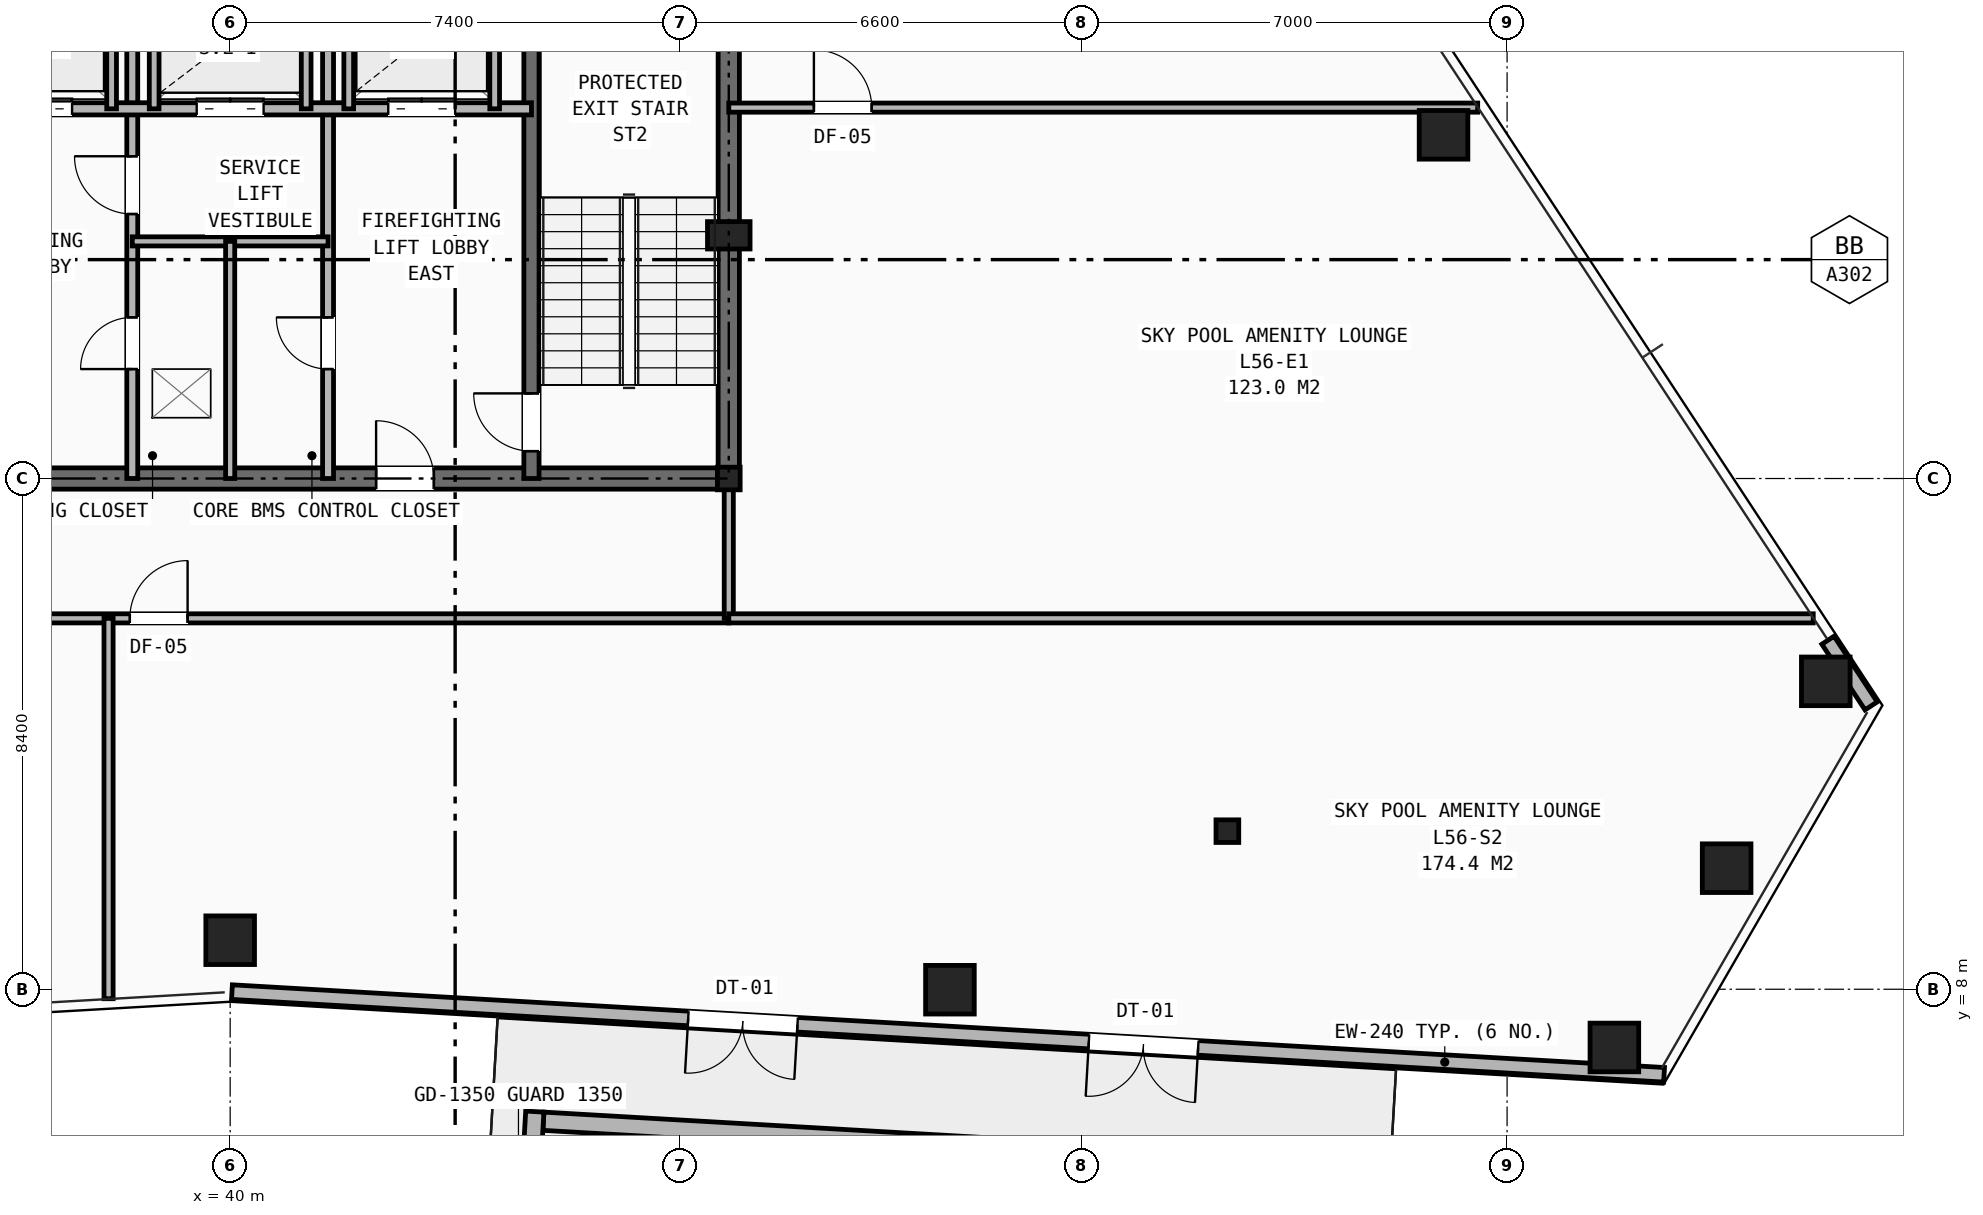
"""IFC4 building model, lengths in metres.
Left out: names, types, materials, properties, quantities, classifications, styles, units other than length and angle.
Written with IfcOpenShell. Run it as: python <this file> out.ifc"""

import sys

from ifc_helpers import new_model, si_unit, direction, frame, frame_2d, origin, origin_2d, place, context, subcontext, project, spatial, rectangle, hollow_rectangle, i_section, extrude, element, fill, save


model = new_model("IFC4")
c1 = context("Model", 3, precision=1e-05, world=origin(), true_north=direction((0.0, 1.0)))
c2 = subcontext(c1, "Body", "Model", "MODEL_VIEW")
j1 = project(units=[si_unit("LENGTHUNIT", "METRE"), si_unit("PLANEANGLEUNIT", "RADIAN")], contexts=[c1])
p1 = place(None, origin())
s1 = spatial("IfcSite", under=j1, at=p1, CompositionType="ELEMENT")
p2 = place(p1, origin())
s2 = spatial("IfcBuilding", under=s1, at=p2, CompositionType="ELEMENT")
p3 = place(p2, frame((0.0, 0.0, 196.5)))
s3 = spatial("IfcBuildingStorey", under=s2, at=p3, CompositionType="ELEMENT", Elevation=196.5)
for number, where, z_axis, x_axis in (
    (1, (48.2, 16.4, 0.0), (0.0, 0.0, 1.0), (1.0, 0.0, 0.0)),
    (2, (56.4, 10.6, 0.0), (0.0, 0.0, 1.0), (1.0, 0.0, 0.0)),
):
    element("IfcColumn", number, at=place(p3, frame(where, z_axis=z_axis, x_axis=x_axis)), inside=s3, PredefinedType="COLUMN", context=c2, shape_type="SweptSolid", body=[
        extrude(i_section(OverallWidth=0.374, OverallDepth=0.372, WebThickness=0.016, FlangeThickness=0.026, at=origin_2d()), origin(), (0.0, 0.0, 1.0), 4.2),
    ])
p4 = place(p3, frame((48.2, 20.4, 0.0), z_axis=(0.0, 0.0, 1.0), x_axis=(1.0, 0.0, 0.0)))
e3 = element("IfcColumn", 3, at=p4, inside=s3, PredefinedType="PILASTER", context=c2, shape_type="SweptSolid", body=[
    extrude(rectangle(XDim=0.7, YDim=0.45, at=origin_2d()), origin(), (0.0, 0.0, 1.0), 4.2),
])
for number, where, z_axis, x_axis in (
    (4, (40.0, 8.806, 0.0), (0.0, 0.0, 1.0), (1.0, 0.0, 0.0)),
    (5, (51.837, 7.992, 0.0), (0.0, 0.0, 1.0), (1.0, 0.0, 0.0)),
    (6, (62.764, 7.042, 0.0), (0.0, 0.0, 1.0), (1.0, 0.0, 0.0)),
    (7, (64.611, 9.991, 0.0), (0.0, 0.0, 1.0), (1.0, 0.0, 0.0)),
    (8, (66.241, 13.064, 0.0), (0.0, 0.0, 1.0), (1.0, 0.0, 0.0)),
    (9, (59.955, 22.052, 0.0), (0.0, 0.0, 1.0), (1.0, 0.0, 0.0)),
):
    element("IfcColumn", number, at=place(p3, frame(where, z_axis=z_axis, x_axis=x_axis)), inside=s3, PredefinedType="COLUMN", context=c2, shape_type="SweptSolid", body=[
        extrude(hollow_rectangle(XDim=0.8, YDim=0.8, WallThickness=0.055, at=origin_2d()), origin(), (0.0, 0.0, 1.0), 4.2),
    ])
p5 = place(p3, frame((63.582, 6.593, 0.0), z_axis=(0.0, 0.0, 1.0), x_axis=(-0.998337343027, 0.057641560683, 0.0)))
e10 = element("IfcWall", 10, at=p5, inside=s3, PredefinedType="SHEAR", context=c2, shape_type="SweptSolid", body=[
    extrude(rectangle(XDim=23.592, YDim=0.24, at=frame_2d((11.796, 0.0))), origin(), (0.0, 0.0, 1.0), 3.313),
])
p6 = place(p5, frame((7.676, 0.0, 0.0)))
e11 = element("IfcOpeningElement", 11, at=p6, cuts=e10, PredefinedType="OPENING", context=c2, shape_type="SweptSolid", body=[
    extrude(rectangle(XDim=1.8, YDim=2.2, at=frame_2d((0.9, 1.1))), frame((0.0, 0.13, 0.0), z_axis=(0.0, -1.0, 0.0), x_axis=(1.0, 0.0, 0.0)), (0.0, 0.0, 1.0), 0.26),
])
p7 = place(p5, frame((14.276, 0.0, 0.0)))
e12 = element("IfcOpeningElement", 12, at=p7, cuts=e10, PredefinedType="OPENING", context=c2, shape_type="SweptSolid", body=[
    extrude(rectangle(XDim=1.8, YDim=2.2, at=frame_2d((0.9, 1.1))), frame((0.0, 0.13, 0.0), z_axis=(0.0, -1.0, 0.0), x_axis=(1.0, 0.0, 0.0)), (0.0, 0.0, 1.0), 0.26),
])
p8 = place(p3, frame((66.987, 12.66, 0.0), z_axis=(0.0, 0.0, 1.0), x_axis=(-0.549064814004, 0.835779773638, 0.0)))
e13 = element("IfcWall", 13, at=p8, inside=s3, PredefinedType="SHEAR", context=c2, shape_type="SweptSolid", body=[
    extrude(rectangle(XDim=1.292, YDim=0.24, at=frame_2d((0.646, 0.0))), origin(), (0.0, 0.0, 1.0), 3.313),
])
p9 = place(p3, frame((45.151, 5.829, 0.0), z_axis=(0.0, 0.0, 1.0), x_axis=(0.998337220259, -0.057643686945, 0.0)))
e14 = element("IfcWall", 14, at=p9, inside=s3, PredefinedType="STANDARD", context=c2, shape_type="SweptSolid", body=[
    extrude(rectangle(XDim=13.1, YDim=0.3, at=frame_2d((6.55, 0.0))), origin(), (0.0, 0.0, 1.0), 1.45),
])
p10 = place(p3, frame((45.01, 5.988, 0.0), z_axis=(0.0, 0.0, 1.0), x_axis=(-0.057659687079, -0.998336296288, 0.0)))
e15 = element("IfcWall", 15, at=p10, inside=s3, PredefinedType="STANDARD", context=c2, shape_type="SweptSolid", body=[
    extrude(rectangle(XDim=5.335, YDim=0.3, at=frame_2d((2.667, 0.0))), origin(), (0.0, 0.0, 1.0), 1.45),
])
p11 = place(p3, frame((31.8, 16.4, 0.0), z_axis=(0.0, 0.0, 1.0), x_axis=(1.0, 0.0, 0.0)))
e16 = element("IfcWall", 16, at=p11, inside=s3, PredefinedType="SHEAR", context=c2, shape_type="SweptSolid", body=[
    extrude(rectangle(XDim=16.4, YDim=0.35, at=frame_2d((8.2, 0.0))), origin(), (0.0, 0.0, 1.0), 3.94),
])
p12 = place(p11, frame((4.2, 0.0, 0.0)))
e17 = element("IfcOpeningElement", 17, at=p12, cuts=e16, PredefinedType="OPENING", context=c2, shape_type="SweptSolid", body=[
    extrude(rectangle(XDim=0.95, YDim=2.1, at=frame_2d((0.475, 1.05))), frame((0.0, 0.185, 0.0), z_axis=(0.0, -1.0, 0.0), x_axis=(1.0, 0.0, 0.0)), (0.0, 0.0, 1.0), 0.37),
])
p13 = place(p11, frame((10.6, 0.0, 0.0)))
e18 = element("IfcOpeningElement", 18, at=p13, cuts=e16, PredefinedType="OPENING", context=c2, shape_type="SweptSolid", body=[
    extrude(rectangle(XDim=0.95, YDim=2.1, at=frame_2d((0.475, 1.05))), frame((0.0, 0.185, 0.0), z_axis=(0.0, -1.0, 0.0), x_axis=(1.0, 0.0, 0.0)), (0.0, 0.0, 1.0), 0.37),
])
p14 = place(p3, frame((48.2, 16.4, 0.0), z_axis=(0.0, 0.0, 1.0), x_axis=(0.0, 1.0, 0.0)))
e19 = element("IfcWall", 19, at=p14, inside=s3, PredefinedType="SHEAR", context=c2, shape_type="SweptSolid", body=[
    extrude(rectangle(XDim=14.8, YDim=0.35, at=frame_2d((7.4, 0.0))), origin(), (0.0, 0.0, 1.0), 3.94),
])
p15 = place(p14, frame((11.0, 0.0, 0.0)))
e20 = element("IfcOpeningElement", 20, at=p15, cuts=e19, PredefinedType="OPENING", context=c2, shape_type="SweptSolid", body=[
    extrude(rectangle(XDim=1.1, YDim=2.15, at=frame_2d((0.55, 1.075))), frame((0.0, 0.185, 0.0), z_axis=(0.0, -1.0, 0.0), x_axis=(1.0, 0.0, 0.0)), (0.0, 0.0, 1.0), 0.37),
])
p16 = place(p3, frame((44.955, 16.4, 0.0), z_axis=(0.0, 0.0, 1.0), x_axis=(0.0, 1.0, 0.0)))
e21 = element("IfcWall", 21, at=p16, inside=s3, PredefinedType="SHEAR", context=c2, shape_type="SweptSolid", body=[
    extrude(rectangle(XDim=8.4, YDim=0.25, at=frame_2d((4.2, 0.0))), origin(), (0.0, 0.0, 1.0), 3.94),
])
p17 = place(p16, frame((0.45, 0.0, 0.0)))
e22 = element("IfcOpeningElement", 22, at=p17, cuts=e21, PredefinedType="OPENING", context=c2, shape_type="SweptSolid", body=[
    extrude(rectangle(XDim=0.95, YDim=2.1, at=frame_2d((0.475, 1.05))), frame((0.0, 0.135, 0.0), z_axis=(0.0, -1.0, 0.0), x_axis=(1.0, 0.0, 0.0)), (0.0, 0.0, 1.0), 0.27),
])
p18 = place(p3, frame((38.39, 16.4, 0.0), z_axis=(0.0, 0.0, 1.0), x_axis=(0.0, 1.0, 0.0)))
e23 = element("IfcWall", 23, at=p18, inside=s3, PredefinedType="PARTITIONING", context=c2, shape_type="SweptSolid", body=[
    extrude(rectangle(XDim=8.4, YDim=0.18, at=frame_2d((4.2, 0.0))), origin(), (0.0, 0.0, 1.0), 3.395),
])
p19 = place(p18, frame((1.8, 0.0, 0.0)))
e24 = element("IfcOpeningElement", 24, at=p19, cuts=e23, PredefinedType="OPENING", context=c2, shape_type="SweptSolid", body=[
    extrude(rectangle(XDim=0.85, YDim=2.05, at=frame_2d((0.425, 1.025))), frame((0.0, 0.1, 0.0), z_axis=(0.0, -1.0, 0.0), x_axis=(1.0, 0.0, 0.0)), (0.0, 0.0, 1.0), 0.2),
])
p20 = place(p18, frame((4.35, 0.0, 0.0)))
e25 = element("IfcOpeningElement", 25, at=p20, cuts=e23, PredefinedType="OPENING", context=c2, shape_type="SweptSolid", body=[
    extrude(rectangle(XDim=0.95, YDim=2.1, at=frame_2d((0.475, 1.05))), frame((0.0, 0.1, 0.0), z_axis=(0.0, -1.0, 0.0), x_axis=(1.0, 0.0, 0.0)), (0.0, 0.0, 1.0), 0.2),
])
p21 = place(p3, frame((41.61, 16.4, 0.0), z_axis=(0.0, 0.0, 1.0), x_axis=(0.0, 1.0, 0.0)))
e26 = element("IfcWall", 26, at=p21, inside=s3, PredefinedType="PARTITIONING", context=c2, shape_type="SweptSolid", body=[
    extrude(rectangle(XDim=8.4, YDim=0.18, at=frame_2d((4.2, 0.0))), origin(), (0.0, 0.0, 1.0), 3.395),
])
p22 = place(p21, frame((1.8, 0.0, 0.0)))
e27 = element("IfcOpeningElement", 27, at=p22, cuts=e26, PredefinedType="OPENING", context=c2, shape_type="SweptSolid", body=[
    extrude(rectangle(XDim=0.85, YDim=2.05, at=frame_2d((0.425, 1.025))), frame((0.0, 0.1, 0.0), z_axis=(0.0, -1.0, 0.0), x_axis=(1.0, 0.0, 0.0)), (0.0, 0.0, 1.0), 0.2),
])
p23 = place(p3, frame((35.045, 22.48, 0.0), z_axis=(0.0, 0.0, 1.0), x_axis=(1.0, 0.0, 0.0)))
e28 = element("IfcWall", 28, at=p23, inside=s3, PredefinedType="SOLIDWALL", context=c2, shape_type="SweptSolid", body=[
    extrude(rectangle(XDim=9.91, YDim=0.2, at=frame_2d((4.955, 0.0))), origin(), (0.0, 0.0, 1.0), 3.94),
])
p24 = place(p23, frame((1.255, 0.0, 0.0)))
e29 = element("IfcOpeningElement", 29, at=p24, cuts=e28, PredefinedType="OPENING", context=c2, shape_type="SweptSolid", body=[
    extrude(rectangle(XDim=1.1, YDim=2.15, at=frame_2d((0.55, 1.075))), frame((0.0, 0.11, 0.0), z_axis=(0.0, -1.0, 0.0), x_axis=(1.0, 0.0, 0.0)), (0.0, 0.0, 1.0), 0.22),
])
p25 = place(p23, frame((7.555, 0.0, 0.0)))
e30 = element("IfcOpeningElement", 30, at=p25, cuts=e28, PredefinedType="OPENING", context=c2, shape_type="SweptSolid", body=[
    extrude(rectangle(XDim=1.1, YDim=2.15, at=frame_2d((0.55, 1.075))), frame((0.0, 0.11, 0.0), z_axis=(0.0, -1.0, 0.0), x_axis=(1.0, 0.0, 0.0)), (0.0, 0.0, 1.0), 0.22),
])
p26 = place(p23, frame((4.405, 0.0, 0.0)))
e31 = element("IfcOpeningElement", 31, at=p26, cuts=e28, PredefinedType="OPENING", context=c2, shape_type="SweptSolid", body=[
    extrude(rectangle(XDim=1.1, YDim=2.15, at=frame_2d((0.55, 1.075))), frame((0.0, 0.11, 0.0), z_axis=(0.0, -1.0, 0.0), x_axis=(1.0, 0.0, 0.0)), (0.0, 0.0, 1.0), 0.22),
])
p27 = place(p3, frame((38.39, 20.3, 0.0), z_axis=(0.0, 0.0, 1.0), x_axis=(1.0, 0.0, 0.0)))
e32 = element("IfcWall", 32, at=p27, inside=s3, PredefinedType="PARTITIONING", context=c2, shape_type="SweptSolid", body=[
    extrude(rectangle(XDim=3.22, YDim=0.15, at=frame_2d((1.61, 0.0))), origin(), (0.0, 0.0, 1.0), 3.94),
])
p28 = place(p3, frame((40.0, 16.4, 0.0), z_axis=(0.0, 0.0, 1.0), x_axis=(0.0, 1.0, 0.0)))
e33 = element("IfcWall", 33, at=p28, inside=s3, PredefinedType="PARTITIONING", context=c2, shape_type="SweptSolid", body=[
    extrude(rectangle(XDim=3.9, YDim=0.15, at=frame_2d((1.95, 0.0))), origin(), (0.0, 0.0, 1.0), 3.395),
])
for number, where, z_axis, x_axis in (
    (34, (38.05, 22.48, 0.0), (0.0, 0.0, 1.0), (0.0, 1.0, 0.0)),
    (35, (41.95, 22.48, 0.0), (0.0, 0.0, 1.0), (0.0, 1.0, 0.0)),
    (36, (44.35, 22.48, 0.0), (0.0, 0.0, 1.0), (0.0, 1.0, 0.0)),
    (37, (38.75, 22.48, 0.0), (0.0, 0.0, 1.0), (0.0, 1.0, 0.0)),
    (38, (41.25, 22.48, 0.0), (0.0, 0.0, 1.0), (0.0, 1.0, 0.0)),
):
    element("IfcWall", number, at=place(p3, frame(where, z_axis=z_axis, x_axis=x_axis)), inside=s3, PredefinedType="SOLIDWALL", context=c2, shape_type="SweptSolid", body=[
        extrude(rectangle(XDim=2.32, YDim=0.16, at=frame_2d((1.16, 0.0))), origin(), (0.0, 0.0, 1.0), 3.94),
    ])
p29 = place(p3, frame((29.6, 14.1, 0.0), z_axis=(0.0, 0.0, 1.0), x_axis=(1.0, 0.0, 0.0)))
e39 = element("IfcWall", 39, at=p29, inside=s3, PredefinedType="PARTITIONING", context=c2, shape_type="SweptSolid", body=[
    extrude(rectangle(XDim=18.6, YDim=0.15, at=frame_2d((9.3, 0.0))), origin(), (0.0, 0.0, 1.0), 3.051),
])
p30 = place(p29, frame((0.55, 0.0, 0.0)))
e40 = element("IfcOpeningElement", 40, at=p30, cuts=e39, PredefinedType="OPENING", context=c2, shape_type="SweptSolid", body=[
    extrude(rectangle(XDim=0.95, YDim=2.1, at=frame_2d((0.475, 1.05))), frame((0.0, 0.085, 0.0), z_axis=(0.0, -1.0, 0.0), x_axis=(1.0, 0.0, 0.0)), (0.0, 0.0, 1.0), 0.17),
])
p31 = place(p29, frame((8.75, 0.0, 0.0)))
e41 = element("IfcOpeningElement", 41, at=p31, cuts=e39, PredefinedType="OPENING", context=c2, shape_type="SweptSolid", body=[
    extrude(rectangle(XDim=0.95, YDim=2.1, at=frame_2d((0.475, 1.05))), frame((0.0, 0.085, 0.0), z_axis=(0.0, -1.0, 0.0), x_axis=(1.0, 0.0, 0.0)), (0.0, 0.0, 1.0), 0.17),
])
p32 = place(p3, frame((48.2, 14.1, 0.0), z_axis=(0.0, 0.0, 1.0), x_axis=(0.0, 1.0, 0.0)))
e42 = element("IfcWall", 42, at=p32, inside=s3, PredefinedType="PARTITIONING", context=c2, shape_type="SweptSolid", body=[
    extrude(rectangle(XDim=2.3, YDim=0.15, at=frame_2d((1.15, 0.0))), origin(), (0.0, 0.0, 1.0), 3.395),
])
p33 = place(p3, frame((38.0, 7.844, 0.0), z_axis=(0.0, 0.0, 1.0), x_axis=(0.0, 1.0, 0.0)))
e43 = element("IfcWall", 43, at=p33, inside=s3, PredefinedType="PARTITIONING", context=c2, shape_type="SweptSolid", body=[
    extrude(rectangle(XDim=6.256, YDim=0.15, at=frame_2d((3.128, 0.0))), origin(), (0.0, 0.0, 1.0), 3.051),
])
p34 = place(p3, frame((48.2, 14.1, 0.0), z_axis=(0.0, 0.0, 1.0), x_axis=(1.0, 0.0, 0.0)))
e44 = element("IfcWall", 44, at=p34, inside=s3, PredefinedType="PARTITIONING", context=c2, shape_type="SweptSolid", body=[
    extrude(rectangle(XDim=17.835, YDim=0.15, at=frame_2d((8.917, 0.0))), origin(), (0.0, 0.0, 1.0), 2.955),
])
p35 = place(p3, frame((48.2, 22.5, 0.0), z_axis=(0.0, 0.0, 1.0), x_axis=(1.0, 0.0, 0.0)))
e45 = element("IfcWall", 45, at=p35, inside=s3, PredefinedType="PARTITIONING", context=c2, shape_type="SweptSolid", body=[
    extrude(rectangle(XDim=12.316, YDim=0.15, at=frame_2d((6.158, 0.0))), origin(), (0.0, 0.0, 1.0), 3.051),
])
p36 = place(p35, frame((1.4, 0.0, 0.0)))
e46 = element("IfcOpeningElement", 46, at=p36, cuts=e45, PredefinedType="OPENING", context=c2, shape_type="SweptSolid", body=[
    extrude(rectangle(XDim=0.95, YDim=2.1, at=frame_2d((0.475, 1.05))), frame((0.0, 0.085, 0.0), z_axis=(0.0, -1.0, 0.0), x_axis=(1.0, 0.0, 0.0)), (0.0, 0.0, 1.0), 0.17),
])
p37 = place(p6, origin())
e47 = element("IfcDoor", 47, at=p37, inside=s3, OperationType="SINGLE_SWING_LEFT", PredefinedType="DOOR", context=c2, shape_type="SweptSolid", body=[
    extrude(rectangle(XDim=1.8, YDim=2.2, at=frame_2d((0.9, 1.1))), frame((0.0, 0.025, 0.0), z_axis=(0.0, -1.0, 0.0), x_axis=(1.0, 0.0, 0.0)), (0.0, 0.0, 1.0), 0.05),
])
fill(e11, e47)
p38 = place(p7, origin())
e48 = element("IfcDoor", 48, at=p38, inside=s3, OperationType="SINGLE_SWING_LEFT", PredefinedType="DOOR", context=c2, shape_type="SweptSolid", body=[
    extrude(rectangle(XDim=1.8, YDim=2.2, at=frame_2d((0.9, 1.1))), frame((0.0, 0.025, 0.0), z_axis=(0.0, -1.0, 0.0), x_axis=(1.0, 0.0, 0.0)), (0.0, 0.0, 1.0), 0.05),
])
fill(e12, e48)
p39 = place(p19, origin())
e49 = element("IfcDoor", 49, at=p39, inside=s3, OperationType="SINGLE_SWING_LEFT", PredefinedType="DOOR", context=c2, shape_type="SweptSolid", body=[
    extrude(rectangle(XDim=0.85, YDim=2.05, at=frame_2d((0.425, 1.025))), frame((0.0, 0.025, 0.0), z_axis=(0.0, -1.0, 0.0), x_axis=(1.0, 0.0, 0.0)), (0.0, 0.0, 1.0), 0.05),
])
fill(e24, e49)
p40 = place(p22, origin())
e50 = element("IfcDoor", 50, at=p40, inside=s3, OperationType="SINGLE_SWING_RIGHT", PredefinedType="DOOR", context=c2, shape_type="SweptSolid", body=[
    extrude(rectangle(XDim=0.85, YDim=2.05, at=frame_2d((0.425, 1.025))), frame((0.0, 0.025, 0.0), z_axis=(0.0, -1.0, 0.0), x_axis=(1.0, 0.0, 0.0)), (0.0, 0.0, 1.0), 0.05),
])
fill(e27, e50)
p41 = place(p20, origin())
e51 = element("IfcDoor", 51, at=p41, inside=s3, OperationType="SINGLE_SWING_RIGHT", PredefinedType="DOOR", context=c2, shape_type="SweptSolid", body=[
    extrude(rectangle(XDim=0.95, YDim=2.1, at=frame_2d((0.475, 1.05))), frame((0.0, 0.025, 0.0), z_axis=(0.0, -1.0, 0.0), x_axis=(1.0, 0.0, 0.0)), (0.0, 0.0, 1.0), 0.05),
])
fill(e25, e51)
p42 = place(p17, origin())
e52 = element("IfcDoor", 52, at=p42, inside=s3, OperationType="SINGLE_SWING_RIGHT", PredefinedType="DOOR", context=c2, shape_type="SweptSolid", body=[
    extrude(rectangle(XDim=0.95, YDim=2.1, at=frame_2d((0.475, 1.05))), frame((0.0, 0.025, 0.0), z_axis=(0.0, -1.0, 0.0), x_axis=(1.0, 0.0, 0.0)), (0.0, 0.0, 1.0), 0.05),
])
fill(e22, e52)
p43 = place(p13, origin())
e53 = element("IfcDoor", 53, at=p43, inside=s3, OperationType="SINGLE_SWING_LEFT", PredefinedType="DOOR", context=c2, shape_type="SweptSolid", body=[
    extrude(rectangle(XDim=0.95, YDim=2.1, at=frame_2d((0.475, 1.05))), frame((0.0, 0.025, 0.0), z_axis=(0.0, -1.0, 0.0), x_axis=(1.0, 0.0, 0.0)), (0.0, 0.0, 1.0), 0.05),
])
fill(e18, e53)
p44 = place(p24, origin())
e54 = element("IfcDoor", 54, at=p44, inside=s3, OperationType="DOUBLE_DOOR_SLIDING", PredefinedType="DOOR", context=c2, shape_type="SweptSolid", body=[
    extrude(rectangle(XDim=1.1, YDim=2.15, at=frame_2d((0.55, 1.075))), frame((0.0, 0.025, 0.0), z_axis=(0.0, -1.0, 0.0), x_axis=(1.0, 0.0, 0.0)), (0.0, 0.0, 1.0), 0.05),
])
fill(e29, e54)
p45 = place(p25, origin())
e55 = element("IfcDoor", 55, at=p45, inside=s3, OperationType="DOUBLE_DOOR_SLIDING", PredefinedType="DOOR", context=c2, shape_type="SweptSolid", body=[
    extrude(rectangle(XDim=1.1, YDim=2.15, at=frame_2d((0.55, 1.075))), frame((0.0, 0.025, 0.0), z_axis=(0.0, -1.0, 0.0), x_axis=(1.0, 0.0, 0.0)), (0.0, 0.0, 1.0), 0.05),
])
fill(e30, e55)
p46 = place(p26, origin())
e56 = element("IfcDoor", 56, at=p46, inside=s3, OperationType="DOUBLE_DOOR_SLIDING", PredefinedType="DOOR", context=c2, shape_type="SweptSolid", body=[
    extrude(rectangle(XDim=1.1, YDim=2.15, at=frame_2d((0.55, 1.075))), frame((0.0, 0.025, 0.0), z_axis=(0.0, -1.0, 0.0), x_axis=(1.0, 0.0, 0.0)), (0.0, 0.0, 1.0), 0.05),
])
fill(e31, e56)
p47 = place(p31, origin())
e57 = element("IfcDoor", 57, at=p47, inside=s3, OperationType="SINGLE_SWING_RIGHT", PredefinedType="DOOR", context=c2, shape_type="SweptSolid", body=[
    extrude(rectangle(XDim=0.95, YDim=2.1, at=frame_2d((0.475, 1.05))), frame((0.0, 0.025, 0.0), z_axis=(0.0, -1.0, 0.0), x_axis=(1.0, 0.0, 0.0)), (0.0, 0.0, 1.0), 0.05),
])
fill(e41, e57)
p48 = place(p36, origin())
e58 = element("IfcDoor", 58, at=p48, inside=s3, OperationType="SINGLE_SWING_LEFT", PredefinedType="DOOR", context=c2, shape_type="SweptSolid", body=[
    extrude(rectangle(XDim=0.95, YDim=2.1, at=frame_2d((0.475, 1.05))), frame((0.0, 0.025, 0.0), z_axis=(0.0, -1.0, 0.0), x_axis=(1.0, 0.0, 0.0)), (0.0, 0.0, 1.0), 0.05),
])
fill(e46, e58)
save(model, sys.argv[1])
